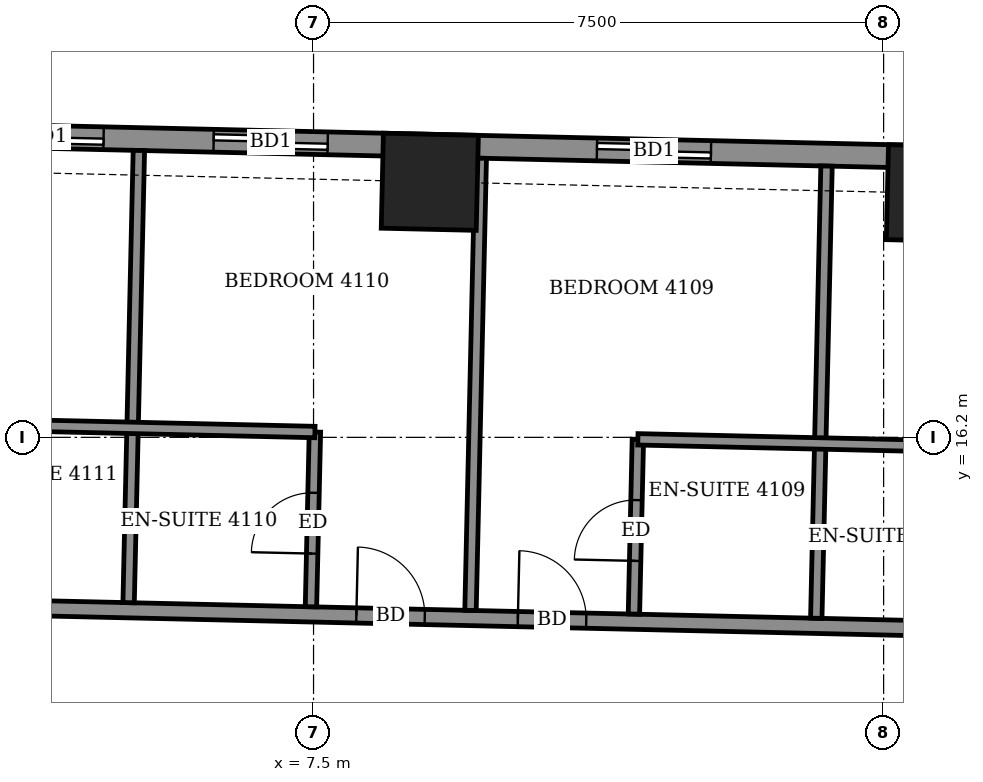
"""IFC4 building model, lengths in metres.
Left out: names, types, materials, properties, quantities, classifications, styles, units other than length and angle.
Written with IfcOpenShell. Run it as: python <this file> out.ifc"""

import sys

from ifc_helpers import new_model, si_unit, direction, frame, frame_2d, origin, origin_2d, place, context, subcontext, project, spatial, rectangle, extrude, element, fill, save


model = new_model("IFC4")
c1 = context("Model", 3, precision=1e-05, world=origin(), true_north=direction((0.0, 1.0)))
c2 = subcontext(c1, "Body", "Model", "MODEL_VIEW")
j1 = project(units=[si_unit("LENGTHUNIT", "METRE"), si_unit("PLANEANGLEUNIT", "RADIAN")], contexts=[c1])
p1 = place(None, origin())
s1 = spatial("IfcSite", under=j1, at=p1, CompositionType="ELEMENT")
p2 = place(p1, origin())
s2 = spatial("IfcBuilding", under=s1, at=p2, CompositionType="ELEMENT")
p3 = place(p2, frame((0.0, 0.0, 163.5)))
s3 = spatial("IfcBuildingStorey", under=s2, at=p3, CompositionType="ELEMENT", Elevation=163.5)
for number, where, z_axis, x_axis in (
    (1, (15.675, 19.411, -0.55), (0.0, 0.0, 1.0), (-1.0, 0.023, 0.0)),
    (2, (9.03, 19.562, -0.55), (0.0, 0.0, 1.0), (-1.0, 0.023, 0.0)),
):
    element("IfcColumn", number, at=place(p3, frame(where, z_axis=z_axis, x_axis=x_axis)), inside=s3, PredefinedType="COLUMN", context=c2, shape_type="SweptSolid", body=[
        extrude(rectangle(XDim=1.25, YDim=1.25, at=origin_2d()), origin(), (0.0, 0.0, 1.0), 3.6),
    ])
p4 = place(p3, frame((22.181, 19.739, 0.0), z_axis=(0.0, 0.0, 1.0), x_axis=(-0.999742618326, 0.022686936846, 0.0)))
e3 = element("IfcWall", 3, at=p4, inside=s3, PredefinedType="SOLIDWALL", context=c2, shape_type="SweptSolid", body=[
    extrude(rectangle(XDim=39.58, YDim=0.3, at=frame_2d((19.79, 0.0))), origin(), (0.0, 0.0, 1.0), 3.05),
])
p5 = place(p4, frame((1.495, 0.0, 0.0)))
e4 = element("IfcOpeningElement", 4, at=p5, cuts=e3, PredefinedType="OPENING", context=c2, shape_type="SweptSolid", body=[
    extrude(rectangle(XDim=1.5, YDim=2.4, at=frame_2d((0.75, 1.2))), frame((0.0, 0.16, 0.0), z_axis=(0.0, -1.0, 0.0), x_axis=(1.0, 0.0, 0.0)), (0.0, 0.0, 1.0), 0.32),
])
p6 = place(p4, frame((4.151, 0.0, 0.0)))
e5 = element("IfcOpeningElement", 5, at=p6, cuts=e3, PredefinedType="OPENING", context=c2, shape_type="SweptSolid", body=[
    extrude(rectangle(XDim=1.5, YDim=2.4, at=frame_2d((0.75, 1.2))), frame((0.0, 0.16, 0.0), z_axis=(0.0, -1.0, 0.0), x_axis=(1.0, 0.0, 0.0)), (0.0, 0.0, 1.0), 0.32),
])
p7 = place(p4, frame((9.455, 0.0, 0.0)))
e6 = element("IfcOpeningElement", 6, at=p7, cuts=e3, PredefinedType="OPENING", context=c2, shape_type="SweptSolid", body=[
    extrude(rectangle(XDim=1.5, YDim=2.4, at=frame_2d((0.75, 1.2))), frame((0.0, 0.16, 0.0), z_axis=(0.0, -1.0, 0.0), x_axis=(1.0, 0.0, 0.0)), (0.0, 0.0, 1.0), 0.32),
])
p8 = place(p4, frame((14.499, 0.0, 0.0)))
e7 = element("IfcOpeningElement", 7, at=p8, cuts=e3, PredefinedType="OPENING", context=c2, shape_type="SweptSolid", body=[
    extrude(rectangle(XDim=1.5, YDim=2.4, at=frame_2d((0.75, 1.2))), frame((0.0, 0.16, 0.0), z_axis=(0.0, -1.0, 0.0), x_axis=(1.0, 0.0, 0.0)), (0.0, 0.0, 1.0), 0.32),
])
p9 = place(p4, frame((17.448, 0.0, 0.0)))
e8 = element("IfcOpeningElement", 8, at=p9, cuts=e3, PredefinedType="OPENING", context=c2, shape_type="SweptSolid", body=[
    extrude(rectangle(XDim=1.5, YDim=2.4, at=frame_2d((0.75, 1.2))), frame((0.0, 0.16, 0.0), z_axis=(0.0, -1.0, 0.0), x_axis=(1.0, 0.0, 0.0)), (0.0, 0.0, 1.0), 0.32),
])
p10 = place(p4, frame((22.905, 0.0, 0.0)))
e9 = element("IfcOpeningElement", 9, at=p10, cuts=e3, PredefinedType="OPENING", context=c2, shape_type="SweptSolid", body=[
    extrude(rectangle(XDim=1.5, YDim=2.4, at=frame_2d((0.75, 1.2))), frame((0.0, 0.16, 0.0), z_axis=(0.0, -1.0, 0.0), x_axis=(1.0, 0.0, 0.0)), (0.0, 0.0, 1.0), 0.32),
])
p11 = place(p4, frame((27.846, 0.0, 0.0)))
e10 = element("IfcOpeningElement", 10, at=p11, cuts=e3, PredefinedType="OPENING", context=c2, shape_type="SweptSolid", body=[
    extrude(rectangle(XDim=1.5, YDim=2.4, at=frame_2d((0.75, 1.2))), frame((0.0, 0.16, 0.0), z_axis=(0.0, -1.0, 0.0), x_axis=(1.0, 0.0, 0.0)), (0.0, 0.0, 1.0), 0.32),
])
p12 = place(p4, frame((30.794, 0.0, 0.0)))
e11 = element("IfcOpeningElement", 11, at=p12, cuts=e3, PredefinedType="OPENING", context=c2, shape_type="SweptSolid", body=[
    extrude(rectangle(XDim=1.5, YDim=2.4, at=frame_2d((0.75, 1.2))), frame((0.0, 0.16, 0.0), z_axis=(0.0, -1.0, 0.0), x_axis=(1.0, 0.0, 0.0)), (0.0, 0.0, 1.0), 0.32),
])
p13 = place(p4, frame((35.63, 0.0, 0.9)))
e12 = element("IfcOpeningElement", 12, at=p13, cuts=e3, PredefinedType="OPENING", context=c2, shape_type="SweptSolid", body=[
    extrude(rectangle(XDim=2.4, YDim=1.5, at=frame_2d((1.2, 0.75))), frame((0.0, 0.16, 0.0), z_axis=(0.0, -1.0, 0.0), x_axis=(1.0, 0.0, 0.0)), (0.0, 0.0, 1.0), 0.32),
])
p14 = place(p3, frame((-21.279, 14.523, 0.0), z_axis=(0.0, 0.0, 1.0), x_axis=(0.999742669174, -0.02268469602, 0.0)))
e13 = element("IfcWall", 13, at=p14, inside=s3, PredefinedType="PARTITIONING", context=c2, shape_type="SweptSolid", body=[
    extrude(rectangle(XDim=40.639, YDim=0.2, at=frame_2d((20.319, 0.0))), origin(), (0.0, 0.0, 1.0), 3.05),
])
p15 = place(p14, frame((38.275, 0.0, 0.0)))
e14 = element("IfcOpeningElement", 14, at=p15, cuts=e13, PredefinedType="OPENING", context=c2, shape_type="SweptSolid", body=[
    extrude(rectangle(XDim=0.9, YDim=2.1, at=frame_2d((0.45, 1.05))), frame((0.0, 0.11, 0.0), z_axis=(0.0, -1.0, 0.0), x_axis=(1.0, 0.0, 0.0)), (0.0, 0.0, 1.0), 0.22),
])
p16 = place(p14, frame((31.475, 0.0, 0.0)))
e15 = element("IfcOpeningElement", 15, at=p16, cuts=e13, PredefinedType="OPENING", context=c2, shape_type="SweptSolid", body=[
    extrude(rectangle(XDim=0.9, YDim=2.1, at=frame_2d((0.45, 1.05))), frame((0.0, 0.11, 0.0), z_axis=(0.0, -1.0, 0.0), x_axis=(1.0, 0.0, 0.0)), (0.0, 0.0, 1.0), 0.22),
])
p17 = place(p14, frame((29.35, 0.0, 0.0)))
e16 = element("IfcOpeningElement", 16, at=p17, cuts=e13, PredefinedType="OPENING", context=c2, shape_type="SweptSolid", body=[
    extrude(rectangle(XDim=0.9, YDim=2.1, at=frame_2d((0.45, 1.05))), frame((0.0, 0.11, 0.0), z_axis=(0.0, -1.0, 0.0), x_axis=(1.0, 0.0, 0.0)), (0.0, 0.0, 1.0), 0.22),
])
p18 = place(p14, frame((22.45, 0.0, 0.0)))
e17 = element("IfcOpeningElement", 17, at=p18, cuts=e13, PredefinedType="OPENING", context=c2, shape_type="SweptSolid", body=[
    extrude(rectangle(XDim=0.9, YDim=2.1, at=frame_2d((0.45, 1.05))), frame((0.0, 0.11, 0.0), z_axis=(0.0, -1.0, 0.0), x_axis=(1.0, 0.0, 0.0)), (0.0, 0.0, 1.0), 0.22),
])
p19 = place(p14, frame((20.425, 0.0, 0.0)))
e18 = element("IfcOpeningElement", 18, at=p19, cuts=e13, PredefinedType="OPENING", context=c2, shape_type="SweptSolid", body=[
    extrude(rectangle(XDim=0.9, YDim=2.1, at=frame_2d((0.45, 1.05))), frame((0.0, 0.11, 0.0), z_axis=(0.0, -1.0, 0.0), x_axis=(1.0, 0.0, 0.0)), (0.0, 0.0, 1.0), 0.22),
])
p20 = place(p14, frame((13.575, 0.0, 0.0)))
e19 = element("IfcOpeningElement", 19, at=p20, cuts=e13, PredefinedType="OPENING", context=c2, shape_type="SweptSolid", body=[
    extrude(rectangle(XDim=0.9, YDim=2.1, at=frame_2d((0.45, 1.05))), frame((0.0, 0.11, 0.0), z_axis=(0.0, -1.0, 0.0), x_axis=(1.0, 0.0, 0.0)), (0.0, 0.0, 1.0), 0.22),
])
p21 = place(p14, frame((11.4, 0.0, 0.0)))
e20 = element("IfcOpeningElement", 20, at=p21, cuts=e13, PredefinedType="OPENING", context=c2, shape_type="SweptSolid", body=[
    extrude(rectangle(XDim=0.9, YDim=2.1, at=frame_2d((0.45, 1.05))), frame((0.0, 0.11, 0.0), z_axis=(0.0, -1.0, 0.0), x_axis=(1.0, 0.0, 0.0)), (0.0, 0.0, 1.0), 0.22),
])
p22 = place(p14, frame((1.575, 0.0, 0.0)))
e21 = element("IfcOpeningElement", 21, at=p22, cuts=e13, PredefinedType="OPENING", context=c2, shape_type="SweptSolid", body=[
    extrude(rectangle(XDim=1.0, YDim=2.1, at=frame_2d((0.5, 1.05))), frame((0.0, 0.11, 0.0), z_axis=(0.0, -1.0, 0.0), x_axis=(1.0, 0.0, 0.0)), (0.0, 0.0, 1.0), 0.22),
])
p23 = place(p14, frame((6.6, 0.0, 0.0)))
e22 = element("IfcOpeningElement", 22, at=p23, cuts=e13, PredefinedType="OPENING", context=c2, shape_type="SweptSolid", body=[
    extrude(rectangle(XDim=0.9, YDim=2.1, at=frame_2d((0.45, 1.05))), frame((0.0, 0.11, 0.0), z_axis=(0.0, -1.0, 0.0), x_axis=(1.0, 0.0, 0.0)), (0.0, 0.0, 1.0), 0.22),
])
p24 = place(p3, frame((5.067, 14.025, 0.0), z_axis=(0.0, 0.0, 1.0), x_axis=(0.022687855237, 0.999742597484, 0.0)))
e23 = element("IfcWall", 23, at=p24, inside=s3, PredefinedType="PARTITIONING", context=c2, shape_type="SweptSolid", body=[
    extrude(rectangle(XDim=5.951, YDim=0.15, at=frame_2d((2.975, 0.0))), origin(), (0.0, 0.0, 1.0), 2.55),
])
p25 = place(p3, frame((7.466, 13.971, 0.0), z_axis=(0.0, 0.0, 1.0), x_axis=(0.022612884682, 0.999744296031, 0.0)))
e24 = element("IfcWall", 24, at=p25, inside=s3, PredefinedType="PARTITIONING", context=c2, shape_type="SweptSolid", body=[
    extrude(rectangle(XDim=2.3, YDim=0.15, at=frame_2d((1.15, 0.0))), origin(), (0.0, 0.0, 1.0), 3.05),
])
p26 = place(p25, frame((0.7, 0.0, 0.0)))
e25 = element("IfcOpeningElement", 25, at=p26, cuts=e24, PredefinedType="OPENING", context=c2, shape_type="SweptSolid", body=[
    extrude(rectangle(XDim=0.8, YDim=2.1, at=frame_2d((0.4, 1.05))), frame((0.0, 0.085, 0.0), z_axis=(0.0, -1.0, 0.0), x_axis=(1.0, 0.0, 0.0)), (0.0, 0.0, 1.0), 0.17),
])
p27 = place(p3, frame((9.565, 13.923, 0.0), z_axis=(0.0, 0.0, 1.0), x_axis=(0.022688785847, 0.999742576365, 0.0)))
e26 = element("IfcWall", 26, at=p27, inside=s3, PredefinedType="PARTITIONING", context=c2, shape_type="SweptSolid", body=[
    extrude(rectangle(XDim=5.95, YDim=0.15, at=frame_2d((2.975, 0.0))), origin(), (0.0, 0.0, 1.0), 2.55),
])
p28 = place(p3, frame((11.715, 13.875, 0.0), z_axis=(0.0, 0.0, 1.0), x_axis=(0.022612884682, 0.999744296031, 0.0)))
e27 = element("IfcWall", 27, at=p28, inside=s3, PredefinedType="PARTITIONING", context=c2, shape_type="SweptSolid", body=[
    extrude(rectangle(XDim=2.3, YDim=0.15, at=frame_2d((1.15, 0.0))), origin(), (0.0, 0.0, 1.0), 3.05),
])
p29 = place(p28, frame((0.7, 0.0, 0.0)))
e28 = element("IfcOpeningElement", 28, at=p29, cuts=e27, PredefinedType="OPENING", context=c2, shape_type="SweptSolid", body=[
    extrude(rectangle(XDim=0.8, YDim=2.1, at=frame_2d((0.4, 1.05))), frame((0.0, 0.085, 0.0), z_axis=(0.0, -1.0, 0.0), x_axis=(1.0, 0.0, 0.0)), (0.0, 0.0, 1.0), 0.17),
])
p30 = place(p3, frame((14.114, 13.82, 0.0), z_axis=(0.0, 0.0, 1.0), x_axis=(0.022688785847, 0.999742576365, 0.0)))
e29 = element("IfcWall", 29, at=p30, inside=s3, PredefinedType="PARTITIONING", context=c2, shape_type="SweptSolid", body=[
    extrude(rectangle(XDim=5.95, YDim=0.15, at=frame_2d((2.975, 0.0))), origin(), (0.0, 0.0, 1.0), 2.55),
])
p31 = place(p3, frame((2.719, 16.379, 0.0), z_axis=(0.0, 0.0, 1.0), x_axis=(0.999742701292, -0.022683280499, 0.0)))
e30 = element("IfcWall", 30, at=p31, inside=s3, PredefinedType="PARTITIONING", context=c2, shape_type="SweptSolid", body=[
    extrude(rectangle(XDim=4.8, YDim=0.15, at=frame_2d((2.4, 0.0))), origin(), (0.0, 0.0, 1.0), 3.05),
])
p32 = place(p3, frame((11.767, 16.174, 0.0), z_axis=(0.0, 0.0, 1.0), x_axis=(0.999741520352, -0.022735269617, 0.0)))
e31 = element("IfcWall", 31, at=p32, inside=s3, PredefinedType="PARTITIONING", context=c2, shape_type="SweptSolid", body=[
    extrude(rectangle(XDim=4.8, YDim=0.15, at=frame_2d((2.4, 0.0))), origin(), (0.0, 0.0, 1.0), 3.05),
])
p33 = place(p7, origin())
e32 = element("IfcDoor", 32, at=p33, inside=s3, OperationType="SLIDING_TO_LEFT", PredefinedType="DOOR", context=c2, shape_type="SweptSolid", body=[
    extrude(rectangle(XDim=1.5, YDim=2.4, at=frame_2d((0.75, 1.2))), frame((0.0, 0.025, 0.0), z_axis=(0.0, -1.0, 0.0), x_axis=(1.0, 0.0, 0.0)), (0.0, 0.0, 1.0), 0.05),
])
fill(e6, e32)
p34 = place(p8, origin())
e33 = element("IfcDoor", 33, at=p34, inside=s3, OperationType="SLIDING_TO_LEFT", PredefinedType="DOOR", context=c2, shape_type="SweptSolid", body=[
    extrude(rectangle(XDim=1.5, YDim=2.4, at=frame_2d((0.75, 1.2))), frame((0.0, 0.025, 0.0), z_axis=(0.0, -1.0, 0.0), x_axis=(1.0, 0.0, 0.0)), (0.0, 0.0, 1.0), 0.05),
])
fill(e7, e33)
p35 = place(p9, origin())
e34 = element("IfcDoor", 34, at=p35, inside=s3, OperationType="SLIDING_TO_LEFT", PredefinedType="DOOR", context=c2, shape_type="SweptSolid", body=[
    extrude(rectangle(XDim=1.5, YDim=2.4, at=frame_2d((0.75, 1.2))), frame((0.0, 0.025, 0.0), z_axis=(0.0, -1.0, 0.0), x_axis=(1.0, 0.0, 0.0)), (0.0, 0.0, 1.0), 0.05),
])
fill(e8, e34)
p36 = place(p16, origin())
e35 = element("IfcDoor", 35, at=p36, inside=s3, OperationType="SINGLE_SWING_LEFT", PredefinedType="DOOR", context=c2, shape_type="SweptSolid", body=[
    extrude(rectangle(XDim=0.9, YDim=2.1, at=frame_2d((0.45, 1.05))), frame((0.0, 0.025, 0.0), z_axis=(0.0, -1.0, 0.0), x_axis=(1.0, 0.0, 0.0)), (0.0, 0.0, 1.0), 0.05),
])
fill(e15, e35)
p37 = place(p29, origin())
e36 = element("IfcDoor", 36, at=p37, inside=s3, OperationType="SINGLE_SWING_LEFT", PredefinedType="DOOR", context=c2, shape_type="SweptSolid", body=[
    extrude(rectangle(XDim=0.8, YDim=2.1, at=frame_2d((0.4, 1.05))), frame((0.0, 0.025, 0.0), z_axis=(0.0, -1.0, 0.0), x_axis=(1.0, 0.0, 0.0)), (0.0, 0.0, 1.0), 0.05),
])
fill(e28, e36)
p38 = place(p17, origin())
e37 = element("IfcDoor", 37, at=p38, inside=s3, OperationType="SINGLE_SWING_RIGHT", PredefinedType="DOOR", context=c2, shape_type="SweptSolid", body=[
    extrude(rectangle(XDim=0.9, YDim=2.1, at=frame_2d((0.45, 1.05))), frame((0.0, 0.025, 0.0), z_axis=(0.0, -1.0, 0.0), x_axis=(1.0, 0.0, 0.0)), (0.0, 0.0, 1.0), 0.05),
])
fill(e16, e37)
p39 = place(p26, origin())
e38 = element("IfcDoor", 38, at=p39, inside=s3, OperationType="SINGLE_SWING_RIGHT", PredefinedType="DOOR", context=c2, shape_type="SweptSolid", body=[
    extrude(rectangle(XDim=0.8, YDim=2.1, at=frame_2d((0.4, 1.05))), frame((0.0, 0.025, 0.0), z_axis=(0.0, -1.0, 0.0), x_axis=(1.0, 0.0, 0.0)), (0.0, 0.0, 1.0), 0.05),
])
fill(e25, e38)
save(model, sys.argv[1])
